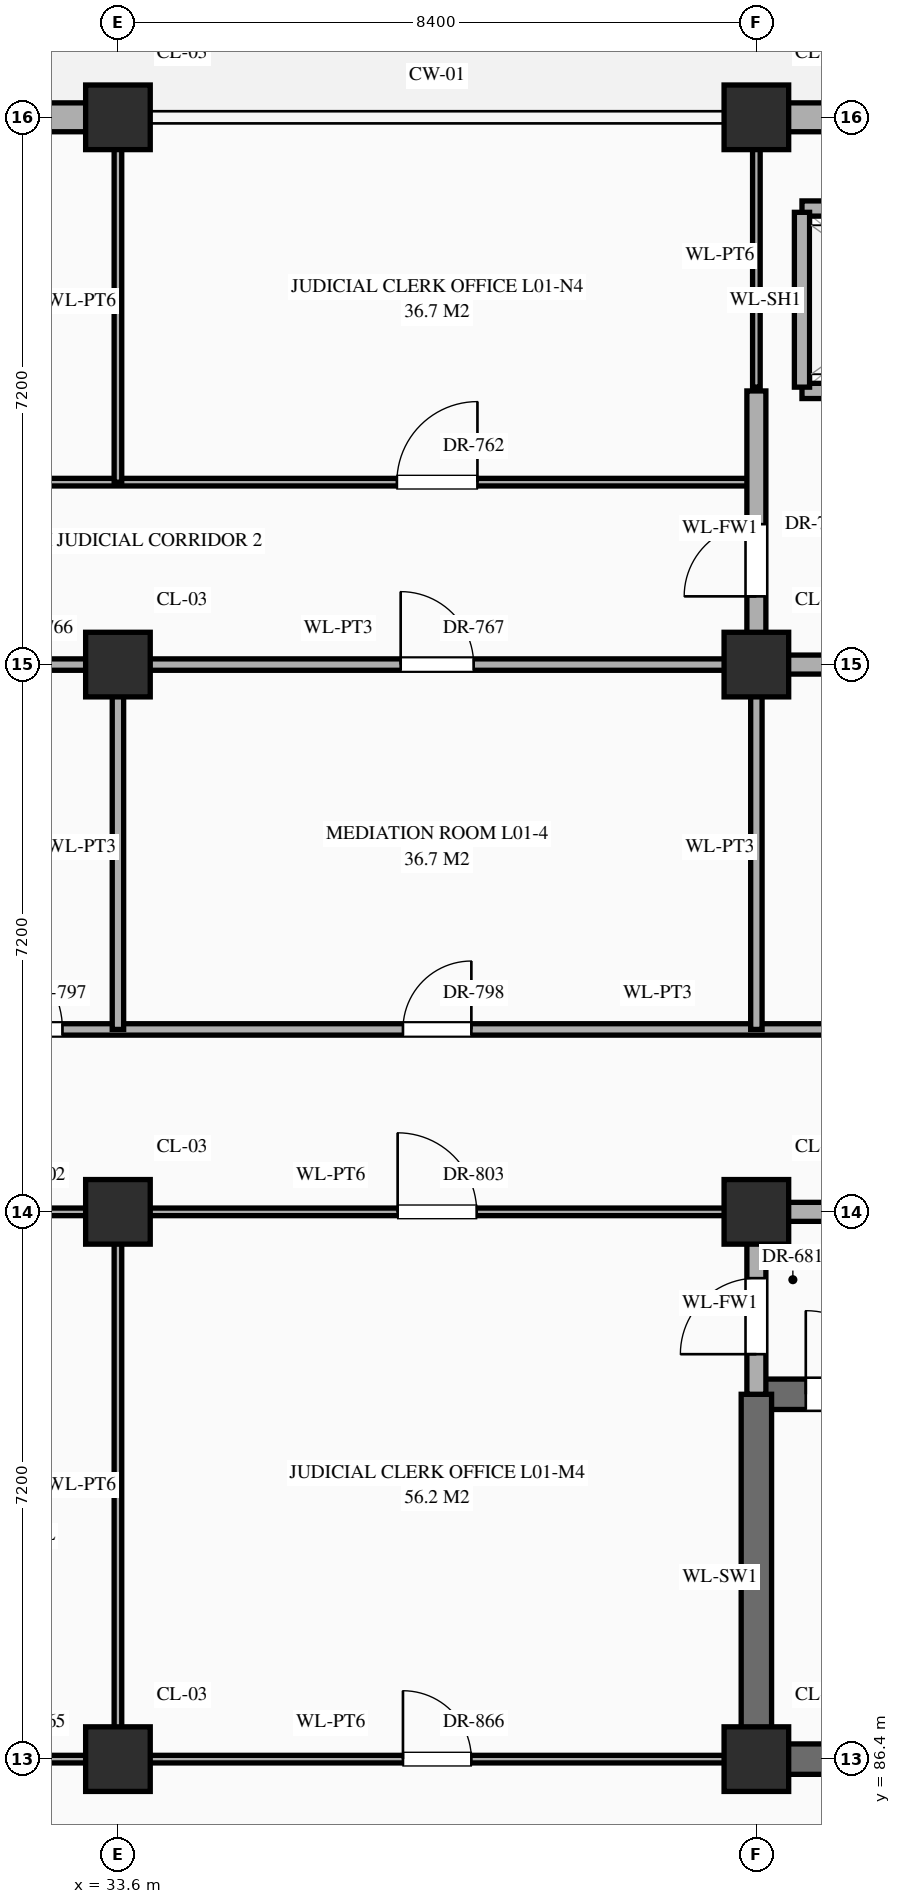
"""IFC4 building model, lengths in metres.
Left out: names, types, materials, properties, quantities, classifications, styles, units other than length and angle.
Written with IfcOpenShell. Run it as: python <this file> out.ifc"""

import sys

from ifc_helpers import new_model, si_unit, direction, frame, frame_2d, origin, origin_2d, place, context, subcontext, project, spatial, rectangle, extrude, element, fill, save


model = new_model("IFC4")
c1 = context("Model", 3, precision=1e-05, world=origin(), true_north=direction((0.0, 1.0)))
c2 = subcontext(c1, "Body", "Model", "MODEL_VIEW")
j1 = project(units=[si_unit("LENGTHUNIT", "METRE"), si_unit("PLANEANGLEUNIT", "RADIAN")], contexts=[c1])
p1 = place(None, origin())
s1 = spatial("IfcSite", under=j1, at=p1, CompositionType="ELEMENT")
p2 = place(p1, origin())
s2 = spatial("IfcBuilding", under=s1, at=p2, CompositionType="ELEMENT")
p3 = place(p2, origin())
s3 = spatial("IfcBuildingStorey", under=s2, at=p3, CompositionType="ELEMENT", Elevation=0.0)
for number, where, z_axis, x_axis in (
    (1, (33.6, 86.4, 0.0), (0.0, 0.0, 1.0), (1.0, 0.0, 0.0)),
    (2, (33.6, 93.6, 0.0), (0.0, 0.0, 1.0), (1.0, 0.0, 0.0)),
    (3, (33.6, 100.8, 0.0), (0.0, 0.0, 1.0), (1.0, 0.0, 0.0)),
    (4, (33.6, 108.0, 0.0), (0.0, 0.0, 1.0), (1.0, 0.0, 0.0)),
    (5, (42.0, 86.4, 0.0), (0.0, 0.0, 1.0), (1.0, 0.0, 0.0)),
    (6, (42.0, 93.6, 0.0), (0.0, 0.0, 1.0), (1.0, 0.0, 0.0)),
    (7, (42.0, 100.8, 0.0), (0.0, 0.0, 1.0), (1.0, 0.0, 0.0)),
    (8, (42.0, 108.0, 0.0), (0.0, 0.0, 1.0), (1.0, 0.0, 0.0)),
):
    element("IfcColumn", number, at=place(p3, frame(where, z_axis=z_axis, x_axis=x_axis)), inside=s3, PredefinedType="COLUMN", context=c2, shape_type="SweptSolid", body=[
        extrude(rectangle(XDim=0.85, YDim=0.85, at=origin_2d()), origin(), (0.0, 0.0, 1.0), 5.4),
    ])
p4 = place(p3, frame((25.62, 108.0, 0.0), z_axis=(0.0, 0.0, 1.0), x_axis=(1.0, 0.0, 0.0)))
e9 = element("IfcWall", 9, at=p4, inside=s3, PredefinedType="STANDARD", context=c2, shape_type="SweptSolid", body=[
    extrude(rectangle(XDim=7.56, YDim=0.38, at=frame_2d((3.78, 0.0))), origin(), (0.0, 0.0, 1.0), 4.47),
])
p5 = place(p4, frame((5.105, 0.0, 0.85)))
e10 = element("IfcOpeningElement", 10, at=p5, cuts=e9, PredefinedType="OPENING", context=c2, shape_type="SweptSolid", body=[
    extrude(rectangle(XDim=1.35, YDim=1.56, at=frame_2d((0.675, 0.78))), frame((0.0, 0.202, 0.0), z_axis=(0.0, -1.0, 0.0), x_axis=(1.0, 0.0, 0.0)), (0.0, 0.0, 1.0), 0.404),
])
p6 = place(p3, frame((42.42, 108.0, 0.0), z_axis=(0.0, 0.0, 1.0), x_axis=(1.0, 0.0, 0.0)))
e11 = element("IfcWall", 11, at=p6, inside=s3, PredefinedType="STANDARD", context=c2, shape_type="SweptSolid", body=[
    extrude(rectangle(XDim=7.535, YDim=0.38, at=frame_2d((3.768, 0.0))), origin(), (0.0, 0.0, 1.0), 4.47),
])
p7 = place(p3, frame((30.8, 86.4, 0.0), z_axis=(0.0, 0.0, 1.0), x_axis=(1.0, 0.0, 0.0)))
e12 = element("IfcWall", 12, at=p7, inside=s3, PredefinedType="STANDARD", context=c2, shape_type="SweptSolid", body=[
    extrude(rectangle(XDim=11.2, YDim=0.1, at=frame_2d((5.6, 0.0))), origin(), (0.0, 0.0, 1.0), 4.27),
])
p8 = place(p7, frame((0.657, 0.0, 0.0)))
e13 = element("IfcOpeningElement", 13, at=p8, cuts=e12, PredefinedType="OPENING", context=c2, shape_type="SweptSolid", body=[
    extrude(rectangle(XDim=1.14, YDim=2.4, at=frame_2d((0.57, 1.2))), frame((0.0, 0.062, 0.0), z_axis=(0.0, -1.0, 0.0), x_axis=(1.0, 0.0, 0.0)), (0.0, 0.0, 1.0), 0.124),
])
p9 = place(p7, frame((6.55, 0.0, 0.0)))
e14 = element("IfcOpeningElement", 14, at=p9, cuts=e12, PredefinedType="OPENING", context=c2, shape_type="SweptSolid", body=[
    extrude(rectangle(XDim=0.9, YDim=2.15, at=frame_2d((0.45, 1.075))), frame((0.0, 0.062, 0.0), z_axis=(0.0, -1.0, 0.0), x_axis=(1.0, 0.0, 0.0)), (0.0, 0.0, 1.0), 0.124),
])
p10 = place(p3, frame((42.0, 86.4, 0.0), z_axis=(0.0, 0.0, 1.0), x_axis=(1.0, 0.0, 0.0)))
e15 = element("IfcWall", 15, at=p10, inside=s3, PredefinedType="SHEAR", context=c2, shape_type="SweptSolid", body=[
    extrude(rectangle(XDim=8.4, YDim=0.4, at=frame_2d((4.2, 0.0))), origin(), (0.0, 0.0, 1.0), 5.12),
])
p11 = place(p3, frame((42.0, 91.2, 0.0), z_axis=(0.0, 0.0, 1.0), x_axis=(1.0, 0.0, 0.0)))
e16 = element("IfcWall", 16, at=p11, inside=s3, PredefinedType="SHEAR", context=c2, shape_type="SweptSolid", body=[
    extrude(rectangle(XDim=8.4, YDim=0.4, at=frame_2d((4.2, 0.0))), origin(), (0.0, 0.0, 1.0), 5.12),
])
p12 = place(p11, frame((0.65, 0.0, 0.0)))
e17 = element("IfcOpeningElement", 17, at=p12, cuts=e16, PredefinedType="OPENING", context=c2, shape_type="SweptSolid", body=[
    extrude(rectangle(XDim=1.1, YDim=2.2, at=frame_2d((0.55, 1.1))), frame((0.0, 0.212, 0.0), z_axis=(0.0, -1.0, 0.0), x_axis=(1.0, 0.0, 0.0)), (0.0, 0.0, 1.0), 0.424),
])
p13 = place(p3, frame((30.8, 93.6, 0.0), z_axis=(0.0, 0.0, 1.0), x_axis=(1.0, 0.0, 0.0)))
e18 = element("IfcWall", 18, at=p13, inside=s3, PredefinedType="STANDARD", context=c2, shape_type="SweptSolid", body=[
    extrude(rectangle(XDim=11.2, YDim=0.1, at=frame_2d((5.6, 0.0))), origin(), (0.0, 0.0, 1.0), 4.27),
])
p14 = place(p13, frame((0.728, 0.0, 0.0)))
e19 = element("IfcOpeningElement", 19, at=p14, cuts=e18, PredefinedType="OPENING", context=c2, shape_type="SweptSolid", body=[
    extrude(rectangle(XDim=1.0, YDim=2.25, at=frame_2d((0.5, 1.125))), frame((0.0, 0.062, 0.0), z_axis=(0.0, -1.0, 0.0), x_axis=(1.0, 0.0, 0.0)), (0.0, 0.0, 1.0), 0.124),
])
p15 = place(p13, frame((6.48, 0.0, 0.0)))
e20 = element("IfcOpeningElement", 20, at=p15, cuts=e18, PredefinedType="OPENING", context=c2, shape_type="SweptSolid", body=[
    extrude(rectangle(XDim=1.04, YDim=2.2, at=frame_2d((0.52, 1.1))), frame((0.0, 0.062, 0.0), z_axis=(0.0, -1.0, 0.0), x_axis=(1.0, 0.0, 0.0)), (0.0, 0.0, 1.0), 0.124),
])
p16 = place(p3, frame((42.0, 93.6, 0.0), z_axis=(0.0, 0.0, 1.0), x_axis=(1.0, 0.0, 0.0)))
e21 = element("IfcWall", 21, at=p16, inside=s3, PredefinedType="STANDARD", context=c2, shape_type="SweptSolid", body=[
    extrude(rectangle(XDim=25.2, YDim=0.25, at=frame_2d((12.6, 0.0))), origin(), (0.0, 0.0, 1.0), 4.27),
])
p17 = place(p16, frame((20.2, 0.0, 0.0)))
e22 = element("IfcOpeningElement", 22, at=p17, cuts=e21, PredefinedType="OPENING", context=c2, shape_type="SweptSolid", body=[
    extrude(rectangle(XDim=1.6, YDim=2.3, at=frame_2d((0.8, 1.15))), frame((0.0, 0.137, 0.0), z_axis=(0.0, -1.0, 0.0), x_axis=(1.0, 0.0, 0.0)), (0.0, 0.0, 1.0), 0.274),
])
p18 = place(p16, frame((3.288, 0.0, 0.0)))
e23 = element("IfcOpeningElement", 23, at=p18, cuts=e21, PredefinedType="OPENING", context=c2, shape_type="SweptSolid", body=[
    extrude(rectangle(XDim=1.8, YDim=2.35, at=frame_2d((0.9, 1.175))), frame((0.0, 0.137, 0.0), z_axis=(0.0, -1.0, 0.0), x_axis=(1.0, 0.0, 0.0)), (0.0, 0.0, 1.0), 0.274),
])
p19 = place(p16, frame((8.985, 0.0, 0.0)))
e24 = element("IfcOpeningElement", 24, at=p19, cuts=e21, PredefinedType="OPENING", context=c2, shape_type="SweptSolid", body=[
    extrude(rectangle(XDim=2.0, YDim=2.4, at=frame_2d((1.0, 1.2))), frame((0.0, 0.137, 0.0), z_axis=(0.0, -1.0, 0.0), x_axis=(1.0, 0.0, 0.0)), (0.0, 0.0, 1.0), 0.274),
])
p20 = place(p16, frame((12.125, 0.0, 0.0)))
e25 = element("IfcOpeningElement", 25, at=p20, cuts=e21, PredefinedType="OPENING", context=c2, shape_type="SweptSolid", body=[
    extrude(rectangle(XDim=0.95, YDim=2.15, at=frame_2d((0.475, 1.075))), frame((0.0, 0.137, 0.0), z_axis=(0.0, -1.0, 0.0), x_axis=(1.0, 0.0, 0.0)), (0.0, 0.0, 1.0), 0.274),
])
p21 = place(p16, frame((14.665, 0.0, 0.0)))
e26 = element("IfcOpeningElement", 26, at=p21, cuts=e21, PredefinedType="OPENING", context=c2, shape_type="SweptSolid", body=[
    extrude(rectangle(XDim=1.1, YDim=2.2, at=frame_2d((0.55, 1.1))), frame((0.0, 0.137, 0.0), z_axis=(0.0, -1.0, 0.0), x_axis=(1.0, 0.0, 0.0)), (0.0, 0.0, 1.0), 0.274),
])
p22 = place(p3, frame((31.0, 96.0, 0.0), z_axis=(0.0, 0.0, 1.0), x_axis=(1.0, 0.0, 0.0)))
e27 = element("IfcWall", 27, at=p22, inside=s3, PredefinedType="STANDARD", context=c2, shape_type="SweptSolid", body=[
    extrude(rectangle(XDim=19.4, YDim=0.15, at=frame_2d((9.7, 0.0))), origin(), (0.0, 0.0, 1.0), 5.12),
])
p23 = place(p22, frame((0.73, 0.0, 0.0)))
e28 = element("IfcOpeningElement", 28, at=p23, cuts=e27, PredefinedType="OPENING", context=c2, shape_type="SweptSolid", body=[
    extrude(rectangle(XDim=1.14, YDim=2.4, at=frame_2d((0.57, 1.2))), frame((0.0, 0.087, 0.0), z_axis=(0.0, -1.0, 0.0), x_axis=(1.0, 0.0, 0.0)), (0.0, 0.0, 1.0), 0.174),
])
p24 = place(p22, frame((6.35, 0.0, 0.0)))
e29 = element("IfcOpeningElement", 29, at=p24, cuts=e27, PredefinedType="OPENING", context=c2, shape_type="SweptSolid", body=[
    extrude(rectangle(XDim=0.9, YDim=2.15, at=frame_2d((0.45, 1.075))), frame((0.0, 0.087, 0.0), z_axis=(0.0, -1.0, 0.0), x_axis=(1.0, 0.0, 0.0)), (0.0, 0.0, 1.0), 0.174),
])
p25 = place(p22, frame((14.77, 0.0, 0.0)))
e30 = element("IfcOpeningElement", 30, at=p25, cuts=e27, PredefinedType="OPENING", context=c2, shape_type="SweptSolid", body=[
    extrude(rectangle(XDim=0.86, YDim=2.1, at=frame_2d((0.43, 1.05))), frame((0.0, 0.087, 0.0), z_axis=(0.0, -1.0, 0.0), x_axis=(1.0, 0.0, 0.0)), (0.0, 0.0, 1.0), 0.174),
])
p26 = place(p3, frame((31.0, 100.8, 0.0), z_axis=(0.0, 0.0, 1.0), x_axis=(1.0, 0.0, 0.0)))
e31 = element("IfcWall", 31, at=p26, inside=s3, PredefinedType="STANDARD", context=c2, shape_type="SweptSolid", body=[
    extrude(rectangle(XDim=11.0, YDim=0.15, at=frame_2d((5.5, 0.0))), origin(), (0.0, 0.0, 1.0), 4.27),
])
p27 = place(p26, frame((0.667, 0.0, 0.0)))
e32 = element("IfcOpeningElement", 32, at=p27, cuts=e31, PredefinedType="OPENING", context=c2, shape_type="SweptSolid", body=[
    extrude(rectangle(XDim=0.92, YDim=2.15, at=frame_2d((0.46, 1.075))), frame((0.0, 0.087, 0.0), z_axis=(0.0, -1.0, 0.0), x_axis=(1.0, 0.0, 0.0)), (0.0, 0.0, 1.0), 0.174),
])
p28 = place(p26, frame((6.32, 0.0, 0.0)))
e33 = element("IfcOpeningElement", 33, at=p28, cuts=e31, PredefinedType="OPENING", context=c2, shape_type="SweptSolid", body=[
    extrude(rectangle(XDim=0.96, YDim=2.2, at=frame_2d((0.48, 1.1))), frame((0.0, 0.087, 0.0), z_axis=(0.0, -1.0, 0.0), x_axis=(1.0, 0.0, 0.0)), (0.0, 0.0, 1.0), 0.174),
])
p29 = place(p3, frame((42.0, 100.8, 0.0), z_axis=(0.0, 0.0, 1.0), x_axis=(1.0, 0.0, 0.0)))
e34 = element("IfcWall", 34, at=p29, inside=s3, PredefinedType="STANDARD", context=c2, shape_type="SweptSolid", body=[
    extrude(rectangle(XDim=4.2, YDim=0.25, at=frame_2d((2.1, 0.0))), origin(), (0.0, 0.0, 1.0), 4.27),
])
p30 = place(p3, frame((16.8, 103.2, 0.0), z_axis=(0.0, 0.0, 1.0), x_axis=(1.0, 0.0, 0.0)))
e35 = element("IfcWall", 35, at=p30, inside=s3, PredefinedType="STANDARD", context=c2, shape_type="SweptSolid", body=[
    extrude(rectangle(XDim=25.2, YDim=0.1, at=frame_2d((12.6, 0.0))), origin(), (0.0, 0.0, 1.0), 5.12),
])
p31 = place(p30, frame((3.71, 0.0, 0.0)))
e36 = element("IfcOpeningElement", 36, at=p31, cuts=e35, PredefinedType="OPENING", context=c2, shape_type="SweptSolid", body=[
    extrude(rectangle(XDim=0.98, YDim=2.35, at=frame_2d((0.49, 1.175))), frame((0.0, 0.062, 0.0), z_axis=(0.0, -1.0, 0.0), x_axis=(1.0, 0.0, 0.0)), (0.0, 0.0, 1.0), 0.124),
])
p32 = place(p30, frame((12.09, 0.0, 0.0)))
e37 = element("IfcOpeningElement", 37, at=p32, cuts=e35, PredefinedType="OPENING", context=c2, shape_type="SweptSolid", body=[
    extrude(rectangle(XDim=1.02, YDim=2.4, at=frame_2d((0.51, 1.2))), frame((0.0, 0.062, 0.0), z_axis=(0.0, -1.0, 0.0), x_axis=(1.0, 0.0, 0.0)), (0.0, 0.0, 1.0), 0.124),
])
p33 = place(p30, frame((20.47, 0.0, 0.0)))
e38 = element("IfcOpeningElement", 38, at=p33, cuts=e35, PredefinedType="OPENING", context=c2, shape_type="SweptSolid", body=[
    extrude(rectangle(XDim=1.06, YDim=2.4, at=frame_2d((0.53, 1.2))), frame((0.0, 0.062, 0.0), z_axis=(0.0, -1.0, 0.0), x_axis=(1.0, 0.0, 0.0)), (0.0, 0.0, 1.0), 0.124),
])
p34 = place(p3, frame((42.6, 104.4, 0.0), z_axis=(0.0, 0.0, 1.0), x_axis=(1.0, 0.0, 0.0)))
e39 = element("IfcWall", 39, at=p34, inside=s3, PredefinedType="STANDARD", context=c2, shape_type="SweptSolid", body=[
    extrude(rectangle(XDim=3.0, YDim=0.2, at=frame_2d((1.5, 0.0))), origin(), (0.0, 0.0, 1.0), 5.12),
])
p35 = place(p34, frame((0.9, 0.0, 0.0)))
e40 = element("IfcOpeningElement", 40, at=p35, cuts=e39, PredefinedType="OPENING", context=c2, shape_type="SweptSolid", body=[
    extrude(rectangle(XDim=1.2, YDim=2.15, at=frame_2d((0.6, 1.075))), frame((0.0, 0.112, 0.0), z_axis=(0.0, -1.0, 0.0), x_axis=(1.0, 0.0, 0.0)), (0.0, 0.0, 1.0), 0.224),
])
p36 = place(p3, frame((42.6, 106.8, 0.0), z_axis=(0.0, 0.0, 1.0), x_axis=(1.0, 0.0, 0.0)))
e41 = element("IfcWall", 41, at=p36, inside=s3, PredefinedType="STANDARD", context=c2, shape_type="SweptSolid", body=[
    extrude(rectangle(XDim=3.0, YDim=0.2, at=frame_2d((1.5, 0.0))), origin(), (0.0, 0.0, 1.0), 5.12),
])
p37 = place(p3, frame((33.6, 86.4, 0.0), z_axis=(0.0, 0.0, 1.0), x_axis=(0.0, 1.0, 0.0)))
e42 = element("IfcWall", 42, at=p37, inside=s3, PredefinedType="STANDARD", context=c2, shape_type="SweptSolid", body=[
    extrude(rectangle(XDim=7.2, YDim=0.1, at=frame_2d((3.6, 0.0))), origin(), (0.0, 0.0, 1.0), 4.37),
])
p38 = place(p3, frame((33.6, 96.0, 0.0), z_axis=(0.0, 0.0, 1.0), x_axis=(0.0, 1.0, 0.0)))
e43 = element("IfcWall", 43, at=p38, inside=s3, PredefinedType="STANDARD", context=c2, shape_type="SweptSolid", body=[
    extrude(rectangle(XDim=4.8, YDim=0.15, at=frame_2d((2.4, 0.0))), origin(), (0.0, 0.0, 1.0), 4.37),
])
p39 = place(p3, frame((33.6, 103.2, 0.0), z_axis=(0.0, 0.0, 1.0), x_axis=(0.0, 1.0, 0.0)))
e44 = element("IfcWall", 44, at=p39, inside=s3, PredefinedType="STANDARD", context=c2, shape_type="SweptSolid", body=[
    extrude(rectangle(XDim=4.76, YDim=0.1, at=frame_2d((2.38, 0.0))), origin(), (0.0, 0.0, 1.0), 4.37),
])
p40 = place(p3, frame((42.0, 86.4, 0.0), z_axis=(0.0, 0.0, 1.0), x_axis=(0.0, 1.0, 0.0)))
e45 = element("IfcWall", 45, at=p40, inside=s3, PredefinedType="SHEAR", context=c2, shape_type="SweptSolid", body=[
    extrude(rectangle(XDim=4.8, YDim=0.4, at=frame_2d((2.4, 0.0))), origin(), (0.0, 0.0, 1.0), 5.12),
])
p41 = place(p3, frame((42.0, 91.2, 0.0), z_axis=(0.0, 0.0, 1.0), x_axis=(0.0, 1.0, 0.0)))
e46 = element("IfcWall", 46, at=p41, inside=s3, PredefinedType="STANDARD", context=c2, shape_type="SweptSolid", body=[
    extrude(rectangle(XDim=2.4, YDim=0.25, at=frame_2d((1.2, 0.0))), origin(), (0.0, 0.0, 1.0), 4.37),
])
p42 = place(p41, frame((0.528, 0.0, 0.0)))
e47 = element("IfcOpeningElement", 47, at=p42, cuts=e46, PredefinedType="OPENING", context=c2, shape_type="SweptSolid", body=[
    extrude(rectangle(XDim=1.0, YDim=2.2, at=frame_2d((0.5, 1.1))), frame((0.0, 0.137, 0.0), z_axis=(0.0, -1.0, 0.0), x_axis=(1.0, 0.0, 0.0)), (0.0, 0.0, 1.0), 0.274),
])
p43 = place(p3, frame((42.0, 96.0, 0.0), z_axis=(0.0, 0.0, 1.0), x_axis=(0.0, 1.0, 0.0)))
e48 = element("IfcWall", 48, at=p43, inside=s3, PredefinedType="STANDARD", context=c2, shape_type="SweptSolid", body=[
    extrude(rectangle(XDim=4.8, YDim=0.15, at=frame_2d((2.4, 0.0))), origin(), (0.0, 0.0, 1.0), 4.37),
])
p44 = place(p3, frame((42.0, 100.8, 0.0), z_axis=(0.0, 0.0, 1.0), x_axis=(0.0, 1.0, 0.0)))
e49 = element("IfcWall", 49, at=p44, inside=s3, PredefinedType="STANDARD", context=c2, shape_type="SweptSolid", body=[
    extrude(rectangle(XDim=3.6, YDim=0.25, at=frame_2d((1.8, 0.0))), origin(), (0.0, 0.0, 1.0), 4.37),
])
p45 = place(p44, frame((0.897, 0.0, 0.0)))
e50 = element("IfcOpeningElement", 50, at=p45, cuts=e49, PredefinedType="OPENING", context=c2, shape_type="SweptSolid", body=[
    extrude(rectangle(XDim=0.95, YDim=2.15, at=frame_2d((0.475, 1.075))), frame((0.0, 0.137, 0.0), z_axis=(0.0, -1.0, 0.0), x_axis=(1.0, 0.0, 0.0)), (0.0, 0.0, 1.0), 0.274),
])
p46 = place(p3, frame((42.0, 104.45, 0.0), z_axis=(0.0, 0.0, 1.0), x_axis=(0.0, 1.0, 0.0)))
e51 = element("IfcWall", 51, at=p46, inside=s3, PredefinedType="STANDARD", context=c2, shape_type="SweptSolid", body=[
    extrude(rectangle(XDim=3.46, YDim=0.1, at=frame_2d((1.73, 0.0))), origin(), (0.0, 0.0, 1.0), 4.37),
])
p47 = place(p3, frame((42.6, 104.45, 0.0), z_axis=(0.0, 0.0, 1.0), x_axis=(0.0, 1.0, 0.0)))
e52 = element("IfcWall", 52, at=p47, inside=s3, PredefinedType="STANDARD", context=c2, shape_type="SweptSolid", body=[
    extrude(rectangle(XDim=2.3, YDim=0.2, at=frame_2d((1.15, 0.0))), origin(), (0.0, 0.0, 1.0), 5.12),
])
p48 = place(p12, origin())
e53 = element("IfcDoor", 53, at=p48, inside=s3, OperationType="SINGLE_SWING_LEFT", PredefinedType="DOOR", context=c2, shape_type="SweptSolid", body=[
    extrude(rectangle(XDim=1.1, YDim=2.2, at=frame_2d((0.55, 1.1))), frame((0.0, 0.025, 0.0), z_axis=(0.0, -1.0, 0.0), x_axis=(1.0, 0.0, 0.0)), (0.0, 0.0, 1.0), 0.05),
])
fill(e17, e53)
p49 = place(p42, origin())
e54 = element("IfcDoor", 54, at=p49, inside=s3, OperationType="SINGLE_SWING_LEFT", PredefinedType="DOOR", context=c2, shape_type="SweptSolid", body=[
    extrude(rectangle(XDim=1.0, YDim=2.2, at=frame_2d((0.5, 1.1))), frame((0.0, 0.025, 0.0), z_axis=(0.0, -1.0, 0.0), x_axis=(1.0, 0.0, 0.0)), (0.0, 0.0, 1.0), 0.05),
])
fill(e47, e54)
p50 = place(p45, origin())
e55 = element("IfcDoor", 55, at=p50, inside=s3, OperationType="SINGLE_SWING_LEFT", PredefinedType="DOOR", context=c2, shape_type="SweptSolid", body=[
    extrude(rectangle(XDim=0.95, YDim=2.15, at=frame_2d((0.475, 1.075))), frame((0.0, 0.025, 0.0), z_axis=(0.0, -1.0, 0.0), x_axis=(1.0, 0.0, 0.0)), (0.0, 0.0, 1.0), 0.05),
])
fill(e50, e55)
p51 = place(p33, origin())
e56 = element("IfcDoor", 56, at=p51, inside=s3, OperationType="SINGLE_SWING_RIGHT", PredefinedType="DOOR", context=c2, shape_type="SweptSolid", body=[
    extrude(rectangle(XDim=1.06, YDim=2.4, at=frame_2d((0.53, 1.2))), frame((0.0, 0.025, 0.0), z_axis=(0.0, -1.0, 0.0), x_axis=(1.0, 0.0, 0.0)), (0.0, 0.0, 1.0), 0.05),
])
fill(e38, e56)
p52 = place(p28, origin())
e57 = element("IfcDoor", 57, at=p52, inside=s3, OperationType="SINGLE_SWING_LEFT", PredefinedType="DOOR", context=c2, shape_type="SweptSolid", body=[
    extrude(rectangle(XDim=0.96, YDim=2.2, at=frame_2d((0.48, 1.1))), frame((0.0, 0.025, 0.0), z_axis=(0.0, -1.0, 0.0), x_axis=(1.0, 0.0, 0.0)), (0.0, 0.0, 1.0), 0.05),
])
fill(e33, e57)
p53 = place(p23, origin())
e58 = element("IfcDoor", 58, at=p53, inside=s3, OperationType="SINGLE_SWING_LEFT", PredefinedType="DOOR", context=c2, shape_type="SweptSolid", body=[
    extrude(rectangle(XDim=1.14, YDim=2.4, at=frame_2d((0.57, 1.2))), frame((0.0, 0.025, 0.0), z_axis=(0.0, -1.0, 0.0), x_axis=(1.0, 0.0, 0.0)), (0.0, 0.0, 1.0), 0.05),
])
fill(e28, e58)
p54 = place(p24, origin())
e59 = element("IfcDoor", 59, at=p54, inside=s3, OperationType="SINGLE_SWING_RIGHT", PredefinedType="DOOR", context=c2, shape_type="SweptSolid", body=[
    extrude(rectangle(XDim=0.9, YDim=2.15, at=frame_2d((0.45, 1.075))), frame((0.0, 0.025, 0.0), z_axis=(0.0, -1.0, 0.0), x_axis=(1.0, 0.0, 0.0)), (0.0, 0.0, 1.0), 0.05),
])
fill(e29, e59)
p55 = place(p15, origin())
e60 = element("IfcDoor", 60, at=p55, inside=s3, OperationType="SINGLE_SWING_LEFT", PredefinedType="DOOR", context=c2, shape_type="SweptSolid", body=[
    extrude(rectangle(XDim=1.04, YDim=2.2, at=frame_2d((0.52, 1.1))), frame((0.0, 0.025, 0.0), z_axis=(0.0, -1.0, 0.0), x_axis=(1.0, 0.0, 0.0)), (0.0, 0.0, 1.0), 0.05),
])
fill(e20, e60)
p56 = place(p9, origin())
e61 = element("IfcDoor", 61, at=p56, inside=s3, OperationType="SINGLE_SWING_LEFT", PredefinedType="DOOR", context=c2, shape_type="SweptSolid", body=[
    extrude(rectangle(XDim=0.9, YDim=2.15, at=frame_2d((0.45, 1.075))), frame((0.0, 0.025, 0.0), z_axis=(0.0, -1.0, 0.0), x_axis=(1.0, 0.0, 0.0)), (0.0, 0.0, 1.0), 0.05),
])
fill(e14, e61)
save(model, sys.argv[1])
